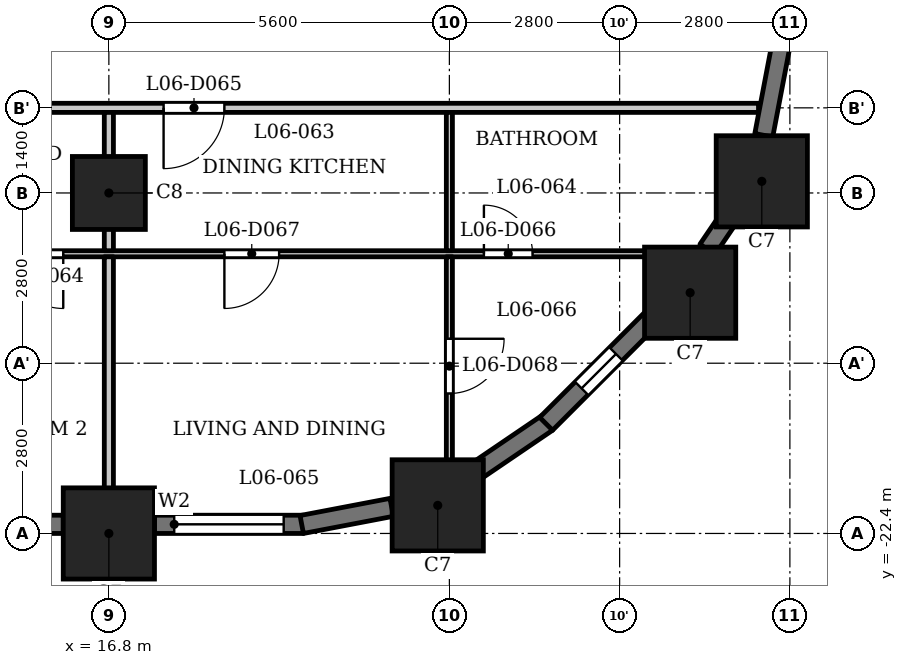
"""IFC4 building model, lengths in metres.
Left out: names, types, materials, properties, quantities, classifications, styles, units other than length and angle.
Written with IfcOpenShell. Run it as: python <this file> out.ifc"""

import sys

from ifc_helpers import new_model, si_unit, direction, frame, frame_2d, origin, origin_2d, place, context, subcontext, project, spatial, rectangle, extrude, element, fill, save


model = new_model("IFC4")
c1 = context("Model", 3, precision=1e-05, world=origin(), true_north=direction((0.0, 1.0)))
c2 = subcontext(c1, "Body", "Model", "MODEL_VIEW")
j1 = project(units=[si_unit("LENGTHUNIT", "METRE"), si_unit("PLANEANGLEUNIT", "RADIAN")], contexts=[c1])
p1 = place(None, origin())
s1 = spatial("IfcSite", under=j1, at=p1, CompositionType="ELEMENT")
p2 = place(p1, origin())
s2 = spatial("IfcBuilding", under=s1, at=p2, CompositionType="ELEMENT")
p3 = place(p2, frame((0.0, 0.0, 30.5)))
s3 = spatial("IfcBuildingStorey", under=s2, at=p3, CompositionType="ELEMENT", Elevation=30.5)
for number, where, z_axis, x_axis in (
    (1, (16.8, -22.4, 0.0), (0.0, 0.0, 1.0), (1.0, 0.0, 0.0)),
    (2, (22.209, -21.938, 0.0), (0.0, 0.0, 1.0), (1.0, 0.0, 0.0)),
    (3, (26.36, -18.44, 0.0), (0.0, 0.0, 1.0), (1.0, 0.0, 0.0)),
    (4, (27.538, -16.609, 0.0), (0.0, 0.0, 1.0), (1.0, 0.0, 0.0)),
):
    element("IfcColumn", number, at=place(p3, frame(where, z_axis=z_axis, x_axis=x_axis)), inside=s3, PredefinedType="COLUMN", context=c2, shape_type="SweptSolid", body=[
        extrude(rectangle(XDim=1.5, YDim=1.5, at=origin_2d()), origin(), (0.0, 0.0, 1.0), 3.5),
    ])
p4 = place(p3, frame((16.8, -16.8, 0.0), z_axis=(0.0, 0.0, 1.0), x_axis=(1.0, 0.0, 0.0)))
e5 = element("IfcColumn", 5, at=p4, inside=s3, PredefinedType="COLUMN", context=c2, shape_type="SweptSolid", body=[
    extrude(rectangle(XDim=1.2, YDim=1.2, at=origin_2d()), origin(), (0.0, 0.0, 1.0), 3.5),
])
p5 = place(p3, frame((11.95, -22.25, 0.0), z_axis=(0.0, 0.0, 1.0), x_axis=(1.0, 0.0, 0.0)))
e6 = element("IfcWall", 6, at=p5, inside=s3, PredefinedType="SOLIDWALL", context=c2, shape_type="SweptSolid", body=[
    extrude(rectangle(XDim=4.1, YDim=0.3, at=frame_2d((2.05, 0.0))), origin(), (0.0, 0.0, 1.0), 2.35),
])
p6 = place(p5, frame((0.387, 0.0, 0.6)))
e7 = element("IfcOpeningElement", 7, at=p6, cuts=e6, PredefinedType="OPENING", context=c2, shape_type="SweptSolid", body=[
    extrude(rectangle(XDim=1.2, YDim=1.55, at=frame_2d((0.6, 0.775))), frame((0.0, 0.16, 0.0), z_axis=(0.0, -1.0, 0.0), x_axis=(1.0, 0.0, 0.0)), (0.0, 0.0, 1.0), 0.32),
])
p7 = place(p5, frame((2.512, 0.0, 0.6)))
e8 = element("IfcOpeningElement", 8, at=p7, cuts=e6, PredefinedType="OPENING", context=c2, shape_type="SweptSolid", body=[
    extrude(rectangle(XDim=1.2, YDim=1.55, at=frame_2d((0.6, 0.775))), frame((0.0, 0.16, 0.0), z_axis=(0.0, -1.0, 0.0), x_axis=(1.0, 0.0, 0.0)), (0.0, 0.0, 1.0), 0.32),
])
p8 = place(p3, frame((17.55, -22.25, 0.0), z_axis=(0.0, 0.0, 1.0), x_axis=(1.0, 0.0, 0.0)))
e9 = element("IfcWall", 9, at=p8, inside=s3, PredefinedType="SOLIDWALL", context=c2, shape_type="SweptSolid", body=[
    extrude(rectangle(XDim=2.45, YDim=0.3, at=frame_2d((1.225, 0.0))), origin(), (0.0, 0.0, 1.0), 2.35),
])
p9 = place(p8, frame((0.325, 0.0, 0.9)))
e10 = element("IfcOpeningElement", 10, at=p9, cuts=e9, PredefinedType="OPENING", context=c2, shape_type="SweptSolid", body=[
    extrude(rectangle(XDim=1.8, YDim=1.25, at=frame_2d((0.9, 0.625))), frame((0.0, 0.16, 0.0), z_axis=(0.0, -1.0, 0.0), x_axis=(1.0, 0.0, 0.0)), (0.0, 0.0, 1.0), 0.32),
])
for number, where, z_axis, x_axis in (
    (11, (19.972, -22.253, 0.0), (0.0, 0.0, 1.0), (0.982, 0.187, 0.0)),
    (12, (22.767, -21.426, 0.0), (0.0, 0.0, 1.0), (0.827, 0.562, 0.0)),
):
    element("IfcWall", number, at=place(p3, frame(where, z_axis=z_axis, x_axis=x_axis)), inside=s3, PredefinedType="SOLIDWALL", context=c2, shape_type="SweptSolid", body=[
        extrude(rectangle(XDim=1.506, YDim=0.3, at=frame_2d((0.753, 0.0))), origin(), (0.0, 0.0, 1.0), 2.35),
    ])
p10 = place(p3, frame((23.991, -20.597, 0.0), z_axis=(0.0, 0.0, 1.0), x_axis=(0.707106781187, 0.707106781187, 0.0)))
e13 = element("IfcWall", 13, at=p10, inside=s3, PredefinedType="SOLIDWALL", context=c2, shape_type="SweptSolid", body=[
    extrude(rectangle(XDim=2.45, YDim=0.3, at=frame_2d((1.225, 0.0))), origin(), (0.0, 0.0, 1.0), 2.35),
])
p11 = place(p10, frame((0.825, 0.0, 0.6)))
e14 = element("IfcOpeningElement", 14, at=p11, cuts=e13, PredefinedType="OPENING", context=c2, shape_type="SweptSolid", body=[
    extrude(rectangle(XDim=0.8, YDim=1.55, at=frame_2d((0.4, 0.775))), frame((0.0, 0.16, 0.0), z_axis=(0.0, -1.0, 0.0), x_axis=(1.0, 0.0, 0.0)), (0.0, 0.0, 1.0), 0.32),
])
p12 = place(p3, frame((26.645, -17.727, 0.0), z_axis=(0.0, 0.0, 1.0), x_axis=(0.562083182981, 0.827080706709, 0.0)))
e15 = element("IfcWall", 15, at=p12, inside=s3, PredefinedType="SOLIDWALL", context=c2, shape_type="SweptSolid", body=[
    extrude(rectangle(XDim=0.677, YDim=0.3, at=frame_2d((0.339, 0.0))), origin(), (0.0, 0.0, 1.0), 3.2),
])
p13 = place(p3, frame((27.571, -15.851, 0.0), z_axis=(0.0, 0.0, 1.0), x_axis=(0.187223837635, 0.982317277982, 0.0)))
e16 = element("IfcWall", 16, at=p13, inside=s3, PredefinedType="SOLIDWALL", context=c2, shape_type="SweptSolid", body=[
    extrude(rectangle(XDim=1.506, YDim=0.3, at=frame_2d((0.753, 0.0))), origin(), (0.0, 0.0, 1.0), 2.35),
])
p14 = place(p3, frame((-26.394, -17.8, 0.0), z_axis=(0.0, 0.0, 1.0), x_axis=(1.0, 0.0, 0.0)))
e17 = element("IfcWall", 17, at=p14, inside=s3, PredefinedType="PARTITIONING", context=c2, shape_type="SweptSolid", body=[
    extrude(rectangle(XDim=53.126, YDim=0.1, at=frame_2d((26.563, 0.0))), origin(), (0.0, 0.0, 1.0), 3.2),
])
p15 = place(p14, frame((0.794, 0.0, 0.0)))
e18 = element("IfcOpeningElement", 18, at=p15, cuts=e17, PredefinedType="OPENING", context=c2, shape_type="SweptSolid", body=[
    extrude(rectangle(XDim=0.8, YDim=2.1, at=frame_2d((0.4, 1.05))), frame((0.0, 0.06, 0.0), z_axis=(0.0, -1.0, 0.0), x_axis=(1.0, 0.0, 0.0)), (0.0, 0.0, 1.0), 0.12),
])
p16 = place(p14, frame((5.644, 0.0, 0.0)))
e19 = element("IfcOpeningElement", 19, at=p16, cuts=e17, PredefinedType="OPENING", context=c2, shape_type="SweptSolid", body=[
    extrude(rectangle(XDim=0.9, YDim=2.1, at=frame_2d((0.45, 1.05))), frame((0.0, 0.06, 0.0), z_axis=(0.0, -1.0, 0.0), x_axis=(1.0, 0.0, 0.0)), (0.0, 0.0, 1.0), 0.12),
])
p17 = place(p14, frame((13.244, 0.0, 0.0)))
e20 = element("IfcOpeningElement", 20, at=p17, cuts=e17, PredefinedType="OPENING", context=c2, shape_type="SweptSolid", body=[
    extrude(rectangle(XDim=0.8, YDim=2.1, at=frame_2d((0.4, 1.05))), frame((0.0, 0.06, 0.0), z_axis=(0.0, -1.0, 0.0), x_axis=(1.0, 0.0, 0.0)), (0.0, 0.0, 1.0), 0.12),
])
p18 = place(p14, frame((11.494, 0.0, 0.0)))
e21 = element("IfcOpeningElement", 21, at=p18, cuts=e17, PredefinedType="OPENING", context=c2, shape_type="SweptSolid", body=[
    extrude(rectangle(XDim=0.9, YDim=2.1, at=frame_2d((0.45, 1.05))), frame((0.0, 0.06, 0.0), z_axis=(0.0, -1.0, 0.0), x_axis=(1.0, 0.0, 0.0)), (0.0, 0.0, 1.0), 0.12),
])
p19 = place(p14, frame((19.344, 0.0, 0.0)))
e22 = element("IfcOpeningElement", 22, at=p19, cuts=e17, PredefinedType="OPENING", context=c2, shape_type="SweptSolid", body=[
    extrude(rectangle(XDim=0.8, YDim=2.1, at=frame_2d((0.4, 1.05))), frame((0.0, 0.06, 0.0), z_axis=(0.0, -1.0, 0.0), x_axis=(1.0, 0.0, 0.0)), (0.0, 0.0, 1.0), 0.12),
])
p20 = place(p14, frame((16.094, 0.0, 0.0)))
e23 = element("IfcOpeningElement", 23, at=p20, cuts=e17, PredefinedType="OPENING", context=c2, shape_type="SweptSolid", body=[
    extrude(rectangle(XDim=0.9, YDim=2.1, at=frame_2d((0.45, 1.05))), frame((0.0, 0.06, 0.0), z_axis=(0.0, -1.0, 0.0), x_axis=(1.0, 0.0, 0.0)), (0.0, 0.0, 1.0), 0.12),
])
p21 = place(p14, frame((24.944, 0.0, 0.0)))
e24 = element("IfcOpeningElement", 24, at=p21, cuts=e17, PredefinedType="OPENING", context=c2, shape_type="SweptSolid", body=[
    extrude(rectangle(XDim=0.8, YDim=2.1, at=frame_2d((0.4, 1.05))), frame((0.0, 0.06, 0.0), z_axis=(0.0, -1.0, 0.0), x_axis=(1.0, 0.0, 0.0)), (0.0, 0.0, 1.0), 0.12),
])
p22 = place(p14, frame((22.444, 0.0, 0.0)))
e25 = element("IfcOpeningElement", 25, at=p22, cuts=e17, PredefinedType="OPENING", context=c2, shape_type="SweptSolid", body=[
    extrude(rectangle(XDim=0.9, YDim=2.1, at=frame_2d((0.45, 1.05))), frame((0.0, 0.06, 0.0), z_axis=(0.0, -1.0, 0.0), x_axis=(1.0, 0.0, 0.0)), (0.0, 0.0, 1.0), 0.12),
])
p23 = place(p14, frame((30.294, 0.0, 0.0)))
e26 = element("IfcOpeningElement", 26, at=p23, cuts=e17, PredefinedType="OPENING", context=c2, shape_type="SweptSolid", body=[
    extrude(rectangle(XDim=0.8, YDim=2.1, at=frame_2d((0.4, 1.05))), frame((0.0, 0.06, 0.0), z_axis=(0.0, -1.0, 0.0), x_axis=(1.0, 0.0, 0.0)), (0.0, 0.0, 1.0), 0.12),
])
p24 = place(p14, frame((26.794, 0.0, 0.0)))
e27 = element("IfcOpeningElement", 27, at=p24, cuts=e17, PredefinedType="OPENING", context=c2, shape_type="SweptSolid", body=[
    extrude(rectangle(XDim=0.9, YDim=2.1, at=frame_2d((0.45, 1.05))), frame((0.0, 0.06, 0.0), z_axis=(0.0, -1.0, 0.0), x_axis=(1.0, 0.0, 0.0)), (0.0, 0.0, 1.0), 0.12),
])
p25 = place(p14, frame((32.744, 0.0, 0.0)))
e28 = element("IfcOpeningElement", 28, at=p25, cuts=e17, PredefinedType="OPENING", context=c2, shape_type="SweptSolid", body=[
    extrude(rectangle(XDim=0.8, YDim=2.1, at=frame_2d((0.4, 1.05))), frame((0.0, 0.06, 0.0), z_axis=(0.0, -1.0, 0.0), x_axis=(1.0, 0.0, 0.0)), (0.0, 0.0, 1.0), 0.12),
])
p26 = place(p14, frame((35.594, 0.0, 0.0)))
e29 = element("IfcOpeningElement", 29, at=p26, cuts=e17, PredefinedType="OPENING", context=c2, shape_type="SweptSolid", body=[
    extrude(rectangle(XDim=0.9, YDim=2.1, at=frame_2d((0.45, 1.05))), frame((0.0, 0.06, 0.0), z_axis=(0.0, -1.0, 0.0), x_axis=(1.0, 0.0, 0.0)), (0.0, 0.0, 1.0), 0.12),
])
p27 = place(p14, frame((39.244, 0.0, 0.0)))
e30 = element("IfcOpeningElement", 30, at=p27, cuts=e17, PredefinedType="OPENING", context=c2, shape_type="SweptSolid", body=[
    extrude(rectangle(XDim=0.9, YDim=2.1, at=frame_2d((0.45, 1.05))), frame((0.0, 0.06, 0.0), z_axis=(0.0, -1.0, 0.0), x_axis=(1.0, 0.0, 0.0)), (0.0, 0.0, 1.0), 0.12),
])
p28 = place(p14, frame((41.544, 0.0, 0.0)))
e31 = element("IfcOpeningElement", 31, at=p28, cuts=e17, PredefinedType="OPENING", context=c2, shape_type="SweptSolid", body=[
    extrude(rectangle(XDim=0.9, YDim=2.1, at=frame_2d((0.45, 1.05))), frame((0.0, 0.06, 0.0), z_axis=(0.0, -1.0, 0.0), x_axis=(1.0, 0.0, 0.0)), (0.0, 0.0, 1.0), 0.12),
])
p29 = place(p14, frame((49.362, 0.0, 0.0)))
e32 = element("IfcOpeningElement", 32, at=p29, cuts=e17, PredefinedType="OPENING", context=c2, shape_type="SweptSolid", body=[
    extrude(rectangle(XDim=0.8, YDim=2.1, at=frame_2d((0.4, 1.05))), frame((0.0, 0.06, 0.0), z_axis=(0.0, -1.0, 0.0), x_axis=(1.0, 0.0, 0.0)), (0.0, 0.0, 1.0), 0.12),
])
p30 = place(p14, frame((45.094, 0.0, 0.0)))
e33 = element("IfcOpeningElement", 33, at=p30, cuts=e17, PredefinedType="OPENING", context=c2, shape_type="SweptSolid", body=[
    extrude(rectangle(XDim=0.9, YDim=2.1, at=frame_2d((0.45, 1.05))), frame((0.0, 0.06, 0.0), z_axis=(0.0, -1.0, 0.0), x_axis=(1.0, 0.0, 0.0)), (0.0, 0.0, 1.0), 0.12),
])
p31 = place(p3, frame((-27.484, -15.4, 0.0), z_axis=(0.0, 0.0, 1.0), x_axis=(1.0, 0.0, 0.0)))
e34 = element("IfcWall", 34, at=p31, inside=s3, PredefinedType="PARTITIONING", context=c2, shape_type="SweptSolid", body=[
    extrude(rectangle(XDim=54.968, YDim=0.15, at=frame_2d((27.484, 0.0))), origin(), (0.0, 0.0, 1.0), 3.2),
])
p32 = place(p31, frame((5.734, 0.0, 0.0)))
e35 = element("IfcOpeningElement", 35, at=p32, cuts=e34, PredefinedType="OPENING", context=c2, shape_type="SweptSolid", body=[
    extrude(rectangle(XDim=1.0, YDim=2.1, at=frame_2d((0.5, 1.05))), frame((0.0, 0.085, 0.0), z_axis=(0.0, -1.0, 0.0), x_axis=(1.0, 0.0, 0.0)), (0.0, 0.0, 1.0), 0.17),
])
p33 = place(p31, frame((11.584, 0.0, 0.0)))
e36 = element("IfcOpeningElement", 36, at=p33, cuts=e34, PredefinedType="OPENING", context=c2, shape_type="SweptSolid", body=[
    extrude(rectangle(XDim=1.0, YDim=2.1, at=frame_2d((0.5, 1.05))), frame((0.0, 0.085, 0.0), z_axis=(0.0, -1.0, 0.0), x_axis=(1.0, 0.0, 0.0)), (0.0, 0.0, 1.0), 0.17),
])
p34 = place(p31, frame((17.184, 0.0, 0.0)))
e37 = element("IfcOpeningElement", 37, at=p34, cuts=e34, PredefinedType="OPENING", context=c2, shape_type="SweptSolid", body=[
    extrude(rectangle(XDim=1.0, YDim=2.1, at=frame_2d((0.5, 1.05))), frame((0.0, 0.085, 0.0), z_axis=(0.0, -1.0, 0.0), x_axis=(1.0, 0.0, 0.0)), (0.0, 0.0, 1.0), 0.17),
])
p35 = place(p31, frame((22.534, 0.0, 0.0)))
e38 = element("IfcOpeningElement", 38, at=p35, cuts=e34, PredefinedType="OPENING", context=c2, shape_type="SweptSolid", body=[
    extrude(rectangle(XDim=1.0, YDim=2.1, at=frame_2d((0.5, 1.05))), frame((0.0, 0.085, 0.0), z_axis=(0.0, -1.0, 0.0), x_axis=(1.0, 0.0, 0.0)), (0.0, 0.0, 1.0), 0.17),
])
p36 = place(p31, frame((28.884, 0.0, 0.0)))
e39 = element("IfcOpeningElement", 39, at=p36, cuts=e34, PredefinedType="OPENING", context=c2, shape_type="SweptSolid", body=[
    extrude(rectangle(XDim=1.0, YDim=2.1, at=frame_2d((0.5, 1.05))), frame((0.0, 0.085, 0.0), z_axis=(0.0, -1.0, 0.0), x_axis=(1.0, 0.0, 0.0)), (0.0, 0.0, 1.0), 0.17),
])
p37 = place(p31, frame((39.334, 0.0, 0.0)))
e40 = element("IfcOpeningElement", 40, at=p37, cuts=e34, PredefinedType="OPENING", context=c2, shape_type="SweptSolid", body=[
    extrude(rectangle(XDim=1.0, YDim=2.1, at=frame_2d((0.5, 1.05))), frame((0.0, 0.085, 0.0), z_axis=(0.0, -1.0, 0.0), x_axis=(1.0, 0.0, 0.0)), (0.0, 0.0, 1.0), 0.17),
])
p38 = place(p31, frame((45.184, 0.0, 0.0)))
e41 = element("IfcOpeningElement", 41, at=p38, cuts=e34, PredefinedType="OPENING", context=c2, shape_type="SweptSolid", body=[
    extrude(rectangle(XDim=1.0, YDim=2.1, at=frame_2d((0.5, 1.05))), frame((0.0, 0.085, 0.0), z_axis=(0.0, -1.0, 0.0), x_axis=(1.0, 0.0, 0.0)), (0.0, 0.0, 1.0), 0.17),
])
p39 = place(p3, frame((16.8, -23.13, 0.0), z_axis=(0.0, 0.0, 1.0), x_axis=(0.0, 1.0, 0.0)))
e42 = element("IfcWall", 42, at=p39, inside=s3, PredefinedType="PARTITIONING", context=c2, shape_type="SweptSolid", body=[
    extrude(rectangle(XDim=5.28, YDim=0.15, at=frame_2d((2.64, 0.0))), origin(), (0.0, 0.0, 1.0), 3.2),
])
p40 = place(p3, frame((16.8, -17.75, 0.0), z_axis=(0.0, 0.0, 1.0), x_axis=(0.0, 1.0, 0.0)))
e43 = element("IfcWall", 43, at=p40, inside=s3, PredefinedType="PARTITIONING", context=c2, shape_type="SweptSolid", body=[
    extrude(rectangle(XDim=2.275, YDim=0.15, at=frame_2d((1.137, 0.0))), origin(), (0.0, 0.0, 1.0), 3.2),
])
p41 = place(p3, frame((22.4, -21.72, 0.0), z_axis=(0.0, 0.0, 1.0), x_axis=(0.0, 1.0, 0.0)))
e44 = element("IfcWall", 44, at=p41, inside=s3, PredefinedType="PARTITIONING", context=c2, shape_type="SweptSolid", body=[
    extrude(rectangle(XDim=3.87, YDim=0.1, at=frame_2d((1.935, 0.0))), origin(), (0.0, 0.0, 1.0), 3.2),
])
p42 = place(p41, frame((1.622, 0.0, 0.0)))
e45 = element("IfcOpeningElement", 45, at=p42, cuts=e44, PredefinedType="OPENING", context=c2, shape_type="SweptSolid", body=[
    extrude(rectangle(XDim=0.9, YDim=2.1, at=frame_2d((0.45, 1.05))), frame((0.0, 0.06, 0.0), z_axis=(0.0, -1.0, 0.0), x_axis=(1.0, 0.0, 0.0)), (0.0, 0.0, 1.0), 0.12),
])
p43 = place(p3, frame((22.4, -17.75, 0.0), z_axis=(0.0, 0.0, 1.0), x_axis=(0.0, 1.0, 0.0)))
e46 = element("IfcWall", 46, at=p43, inside=s3, PredefinedType="PARTITIONING", context=c2, shape_type="SweptSolid", body=[
    extrude(rectangle(XDim=2.275, YDim=0.1, at=frame_2d((1.137, 0.0))), origin(), (0.0, 0.0, 1.0), 3.2),
])
p44 = place(p28, origin())
e47 = element("IfcDoor", 47, at=p44, inside=s3, OperationType="SINGLE_SWING_RIGHT", PredefinedType="DOOR", context=c2, shape_type="SweptSolid", body=[
    extrude(rectangle(XDim=0.9, YDim=2.1, at=frame_2d((0.45, 1.05))), frame((0.0, 0.025, 0.0), z_axis=(0.0, -1.0, 0.0), x_axis=(1.0, 0.0, 0.0)), (0.0, 0.0, 1.0), 0.05),
])
fill(e31, e47)
p45 = place(p38, origin())
e48 = element("IfcDoor", 48, at=p45, inside=s3, OperationType="SINGLE_SWING_LEFT", PredefinedType="DOOR", context=c2, shape_type="SweptSolid", body=[
    extrude(rectangle(XDim=1.0, YDim=2.1, at=frame_2d((0.5, 1.05))), frame((0.0, 0.025, 0.0), z_axis=(0.0, -1.0, 0.0), x_axis=(1.0, 0.0, 0.0)), (0.0, 0.0, 1.0), 0.05),
])
fill(e41, e48)
p46 = place(p29, origin())
e49 = element("IfcDoor", 49, at=p46, inside=s3, OperationType="SINGLE_SWING_RIGHT", PredefinedType="DOOR", context=c2, shape_type="SweptSolid", body=[
    extrude(rectangle(XDim=0.8, YDim=2.1, at=frame_2d((0.4, 1.05))), frame((0.0, 0.025, 0.0), z_axis=(0.0, -1.0, 0.0), x_axis=(1.0, 0.0, 0.0)), (0.0, 0.0, 1.0), 0.05),
])
fill(e32, e49)
p47 = place(p30, origin())
e50 = element("IfcDoor", 50, at=p47, inside=s3, OperationType="SINGLE_SWING_LEFT", PredefinedType="DOOR", context=c2, shape_type="SweptSolid", body=[
    extrude(rectangle(XDim=0.9, YDim=2.1, at=frame_2d((0.45, 1.05))), frame((0.0, 0.025, 0.0), z_axis=(0.0, -1.0, 0.0), x_axis=(1.0, 0.0, 0.0)), (0.0, 0.0, 1.0), 0.05),
])
fill(e33, e50)
p48 = place(p42, origin())
e51 = element("IfcDoor", 51, at=p48, inside=s3, OperationType="SINGLE_SWING_RIGHT", PredefinedType="DOOR", context=c2, shape_type="SweptSolid", body=[
    extrude(rectangle(XDim=0.9, YDim=2.1, at=frame_2d((0.45, 1.05))), frame((0.0, 0.025, 0.0), z_axis=(0.0, -1.0, 0.0), x_axis=(1.0, 0.0, 0.0)), (0.0, 0.0, 1.0), 0.05),
])
fill(e45, e51)
p49 = place(p9, origin())
e52 = element("IfcWindow", 52, at=p49, inside=s3, PartitioningType="SINGLE_PANEL", PredefinedType="WINDOW", context=c2, shape_type="SweptSolid", body=[
    extrude(rectangle(XDim=1.8, YDim=1.25, at=frame_2d((0.9, 0.625))), frame((0.0, 0.03, 0.0), z_axis=(0.0, -1.0, 0.0), x_axis=(1.0, 0.0, 0.0)), (0.0, 0.0, 1.0), 0.06),
])
fill(e10, e52)
p50 = place(p11, origin())
e53 = element("IfcWindow", 53, at=p50, inside=s3, PartitioningType="SINGLE_PANEL", PredefinedType="WINDOW", context=c2, shape_type="SweptSolid", body=[
    extrude(rectangle(XDim=0.8, YDim=1.55, at=frame_2d((0.4, 0.775))), frame((0.0, 0.03, 0.0), z_axis=(0.0, -1.0, 0.0), x_axis=(1.0, 0.0, 0.0)), (0.0, 0.0, 1.0), 0.06),
])
fill(e14, e53)
save(model, sys.argv[1])
